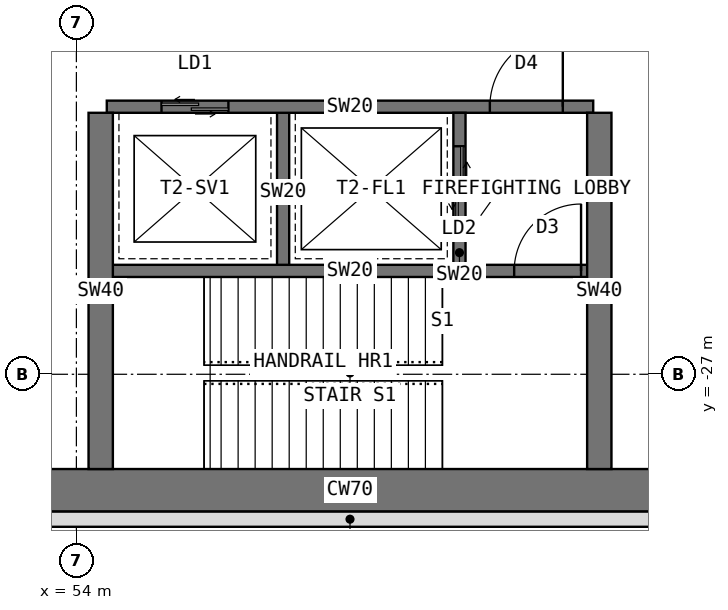
"""IFC4 building model, lengths in metres.
Left out: names, types, materials, properties, quantities, classifications, styles, units other than length and angle.
Written with IfcOpenShell. Run it as: python <this file> out.ifc"""

import sys

from ifc_helpers import new_model, si_unit, direction, frame, frame_2d, origin, place, context, subcontext, project, spatial, rectangle, extrude, element, fill, save


model = new_model("IFC4")
c1 = context("Model", 3, precision=1e-05, world=origin(), true_north=direction((0.0, 1.0)))
c2 = subcontext(c1, "Body", "Model", "MODEL_VIEW")
j1 = project(units=[si_unit("LENGTHUNIT", "METRE"), si_unit("PLANEANGLEUNIT", "RADIAN")], contexts=[c1])
p1 = place(None, origin())
s1 = spatial("IfcSite", under=j1, at=p1, CompositionType="ELEMENT")
p2 = place(p1, origin())
s2 = spatial("IfcBuilding", under=s1, at=p2, CompositionType="ELEMENT")
p3 = place(p2, origin())
s3 = spatial("IfcBuildingStorey", under=s2, at=p3, CompositionType="ELEMENT", Elevation=0.0)
p4 = place(p3, frame((52.202, -28.908, 0.0), z_axis=(0.0, 0.0, 1.0), x_axis=(1.0, 0.0, 0.0)))
e1 = element("IfcWall", 1, at=p4, inside=s3, PredefinedType="SHEAR", context=c2, shape_type="SweptSolid", body=[
    extrude(rectangle(XDim=12.596, YDim=0.7, at=frame_2d((6.298, 0.0))), origin(), (0.0, 0.0, 1.0), 5.5),
])
p5 = place(p3, frame((54.5, -22.6, 0.0), z_axis=(0.0, 0.0, 1.0), x_axis=(1.0, 0.0, 0.0)))
e2 = element("IfcWall", 2, at=p5, inside=s3, PredefinedType="SHEAR", context=c2, shape_type="SweptSolid", body=[
    extrude(rectangle(XDim=8.0, YDim=0.2, at=frame_2d((4.0, 0.0))), origin(), (0.0, 0.0, 1.0), 5.5),
])
p6 = place(p5, frame((6.3, 0.0, 0.0)))
e3 = element("IfcOpeningElement", 3, at=p6, cuts=e2, PredefinedType="OPENING", context=c2, shape_type="SweptSolid", body=[
    extrude(rectangle(XDim=1.2, YDim=2.1, at=frame_2d((0.6, 1.05))), frame((0.0, 0.11, 0.0), z_axis=(0.0, -1.0, 0.0), x_axis=(1.0, 0.0, 0.0)), (0.0, 0.0, 1.0), 0.22),
])
p7 = place(p5, frame((0.9, 0.0, 0.0)))
e4 = element("IfcOpeningElement", 4, at=p7, cuts=e2, PredefinedType="OPENING", context=c2, shape_type="SweptSolid", body=[
    extrude(rectangle(XDim=1.1, YDim=2.2, at=frame_2d((0.55, 1.1))), frame((0.0, 0.11, 0.0), z_axis=(0.0, -1.0, 0.0), x_axis=(1.0, 0.0, 0.0)), (0.0, 0.0, 1.0), 0.22),
])
p8 = place(p3, frame((57.4, -22.7, 0.0), z_axis=(0.0, 0.0, 1.0), x_axis=(0.0, -1.0, 0.0)))
e5 = element("IfcWall", 5, at=p8, inside=s3, PredefinedType="SHEAR", context=c2, shape_type="SweptSolid", body=[
    extrude(rectangle(XDim=2.6, YDim=0.2, at=frame_2d((1.3, 0.0))), origin(), (0.0, 0.0, 1.0), 5.5),
])
p9 = place(p3, frame((60.3, -22.7, 0.0), z_axis=(0.0, 0.0, 1.0), x_axis=(0.0, -1.0, 0.0)))
e6 = element("IfcWall", 6, at=p9, inside=s3, PredefinedType="SHEAR", context=c2, shape_type="SweptSolid", body=[
    extrude(rectangle(XDim=2.6, YDim=0.2, at=frame_2d((1.3, 0.0))), origin(), (0.0, 0.0, 1.0), 5.5),
])
p10 = place(p9, frame((0.55, 0.0, 0.0)))
e7 = element("IfcOpeningElement", 7, at=p10, cuts=e6, PredefinedType="OPENING", context=c2, shape_type="SweptSolid", body=[
    extrude(rectangle(XDim=1.3, YDim=2.2, at=frame_2d((0.65, 1.1))), frame((0.0, 0.11, 0.0), z_axis=(0.0, -1.0, 0.0), x_axis=(1.0, 0.0, 0.0)), (0.0, 0.0, 1.0), 0.22),
])
p11 = place(p3, frame((54.5, -25.3, 0.0), z_axis=(0.0, 0.0, 1.0), x_axis=(1.0, 0.0, 0.0)))
e8 = element("IfcWall", 8, at=p11, inside=s3, PredefinedType="SHEAR", context=c2, shape_type="SweptSolid", body=[
    extrude(rectangle(XDim=8.0, YDim=0.2, at=frame_2d((4.0, 0.0))), origin(), (0.0, 0.0, 1.0), 5.5),
])
p12 = place(p11, frame((6.7, 0.0, 0.0)))
e9 = element("IfcOpeningElement", 9, at=p12, cuts=e8, PredefinedType="OPENING", context=c2, shape_type="SweptSolid", body=[
    extrude(rectangle(XDim=1.1, YDim=2.1, at=frame_2d((0.55, 1.05))), frame((0.0, 0.11, 0.0), z_axis=(0.0, -1.0, 0.0), x_axis=(1.0, 0.0, 0.0)), (0.0, 0.0, 1.0), 0.22),
])
for number, where, z_axis, x_axis in (
    (10, (62.6, -22.7, 0.0), (0.0, 0.0, 1.0), (0.0, -1.0, 0.0)),
    (11, (54.4, -22.7, 0.0), (0.0, 0.0, 1.0), (0.0, -1.0, 0.0)),
):
    element("IfcWall", number, at=place(p3, frame(where, z_axis=z_axis, x_axis=x_axis)), inside=s3, PredefinedType="SHEAR", context=c2, shape_type="SweptSolid", body=[
        extrude(rectangle(XDim=5.858, YDim=0.4, at=frame_2d((2.929, 0.0))), origin(), (0.0, 0.0, 1.0), 5.5),
    ])
p13 = place(p3, frame((64.467, -29.383, 0.0), z_axis=(0.0, 0.0, 1.0), x_axis=(-1.0, 0.0, 0.0)))
e12 = element("IfcWall", 12, at=p13, inside=s3, PredefinedType="STANDARD", context=c2, shape_type="SweptSolid", body=[
    extrude(rectangle(XDim=11.933, YDim=0.25, at=frame_2d((5.967, 0.0))), origin(), (0.0, 0.0, 1.0), 5.15),
])
p14 = place(p6, origin())
e13 = element("IfcDoor", 13, at=p14, inside=s3, OperationType="SINGLE_SWING_RIGHT", PredefinedType="DOOR", context=c2, shape_type="SweptSolid", body=[
    extrude(rectangle(XDim=1.2, YDim=2.1, at=frame_2d((0.6, 1.05))), frame((0.0, 0.025, 0.0), z_axis=(0.0, -1.0, 0.0), x_axis=(1.0, 0.0, 0.0)), (0.0, 0.0, 1.0), 0.05),
])
fill(e3, e13)
p15 = place(p10, origin())
e14 = element("IfcDoor", 14, at=p15, inside=s3, OperationType="DOUBLE_DOOR_SLIDING", PredefinedType="DOOR", context=c2, shape_type="SweptSolid", body=[
    extrude(rectangle(XDim=1.3, YDim=2.2, at=frame_2d((0.65, 1.1))), frame((0.0, 0.025, 0.0), z_axis=(0.0, -1.0, 0.0), x_axis=(1.0, 0.0, 0.0)), (0.0, 0.0, 1.0), 0.05),
])
fill(e7, e14)
p16 = place(p7, origin())
e15 = element("IfcDoor", 15, at=p16, inside=s3, OperationType="DOUBLE_DOOR_SLIDING", PredefinedType="DOOR", context=c2, shape_type="SweptSolid", body=[
    extrude(rectangle(XDim=1.1, YDim=2.2, at=frame_2d((0.55, 1.1))), frame((0.0, 0.025, 0.0), z_axis=(0.0, -1.0, 0.0), x_axis=(1.0, 0.0, 0.0)), (0.0, 0.0, 1.0), 0.05),
])
fill(e4, e15)
p17 = place(p12, origin())
e16 = element("IfcDoor", 16, at=p17, inside=s3, OperationType="SINGLE_SWING_RIGHT", PredefinedType="DOOR", context=c2, shape_type="SweptSolid", body=[
    extrude(rectangle(XDim=1.1, YDim=2.1, at=frame_2d((0.55, 1.05))), frame((0.0, 0.025, 0.0), z_axis=(0.0, -1.0, 0.0), x_axis=(1.0, 0.0, 0.0)), (0.0, 0.0, 1.0), 0.05),
])
fill(e9, e16)
save(model, sys.argv[1])
